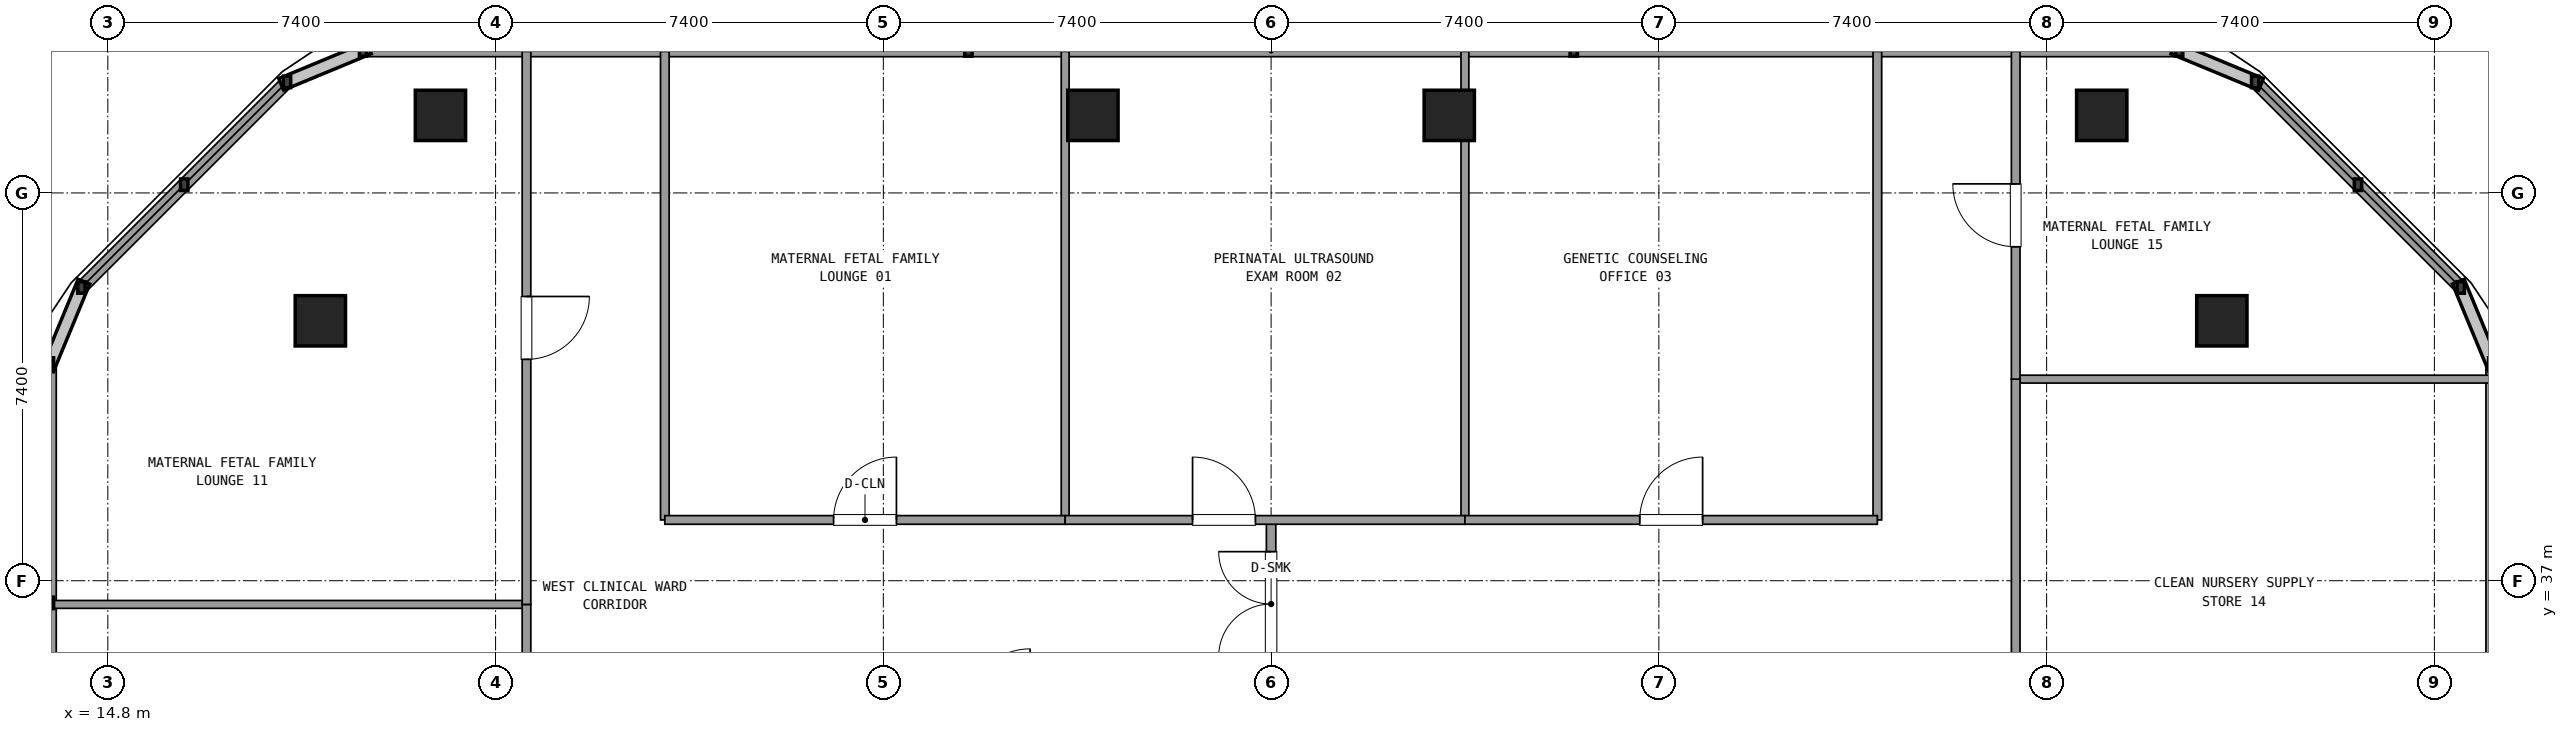
"""IFC4 building model, lengths in metres.
Left out: names, types, materials, properties, quantities, classifications, styles, units other than length and angle.
Written with IfcOpenShell. Run it as: python <this file> out.ifc"""

import sys

from ifc_helpers import new_model, si_unit, direction, frame, frame_2d, origin, origin_2d, place, context, subcontext, project, spatial, rectangle, extrude, element, fill, save


model = new_model("IFC4")
c1 = context("Model", 3, precision=1e-05, world=origin(), true_north=direction((0.0, 1.0)))
c2 = subcontext(c1, "Body", "Model", "MODEL_VIEW")
j1 = project(units=[si_unit("LENGTHUNIT", "METRE"), si_unit("PLANEANGLEUNIT", "RADIAN")], contexts=[c1])
p1 = place(None, origin())
s1 = spatial("IfcSite", under=j1, at=p1, CompositionType="ELEMENT")
p2 = place(p1, origin())
s2 = spatial("IfcBuilding", under=s1, at=p2, CompositionType="ELEMENT")
p3 = place(p2, frame((0.0, 0.0, 163.62)))
s3 = spatial("IfcBuildingStorey", under=s2, at=p3, CompositionType="ELEMENT", Elevation=163.62)
for number, where, z_axis, x_axis in (
    (1, (55.144, 41.96, 0.0), (0.0, 0.0, 1.0), (1.0, 0.0, 0.0)),
    (2, (52.852, 45.88, 0.0), (0.0, 0.0, 1.0), (1.0, 0.0, 0.0)),
    (3, (40.4, 45.88, 0.0), (0.0, 0.0, 1.0), (1.0, 0.0, 0.0)),
    (4, (33.6, 45.88, 0.0), (0.0, 0.0, 1.0), (1.0, 0.0, 0.0)),
    (5, (21.148, 45.88, 0.0), (0.0, 0.0, 1.0), (1.0, 0.0, 0.0)),
    (6, (18.856, 41.96, 0.0), (0.0, 0.0, 1.0), (1.0, 0.0, 0.0)),
):
    element("IfcColumn", number, at=place(p3, frame(where, z_axis=z_axis, x_axis=x_axis)), inside=s3, PredefinedType="COLUMN", context=c2, shape_type="SweptSolid", body=[
        extrude(rectangle(XDim=0.96, YDim=0.96, at=origin_2d()), origin(), (0.0, 0.0, 1.0), 3.6),
    ])
p4 = place(p3, frame((60.304, 10.655, 0.0), z_axis=(0.0, 0.0, 1.0), x_axis=(0.0, 1.0, 0.0)))
e7 = element("IfcWall", 7, at=p4, inside=s3, PredefinedType="SOLIDWALL", context=c2, shape_type="SweptSolid", body=[
    extrude(rectangle(XDim=30.49, YDim=0.24, at=frame_2d((15.245, 0.0))), origin(), (0.0, 0.0, 1.0), 0.85),
])
p5 = place(p3, frame((59.703, 42.596, 0.0), z_axis=(0.0, 0.0, 1.0), x_axis=(-0.707084777957, 0.707128783731, 0.0)))
e8 = element("IfcWall", 8, at=p5, inside=s3, PredefinedType="SOLIDWALL", context=c2, shape_type="SweptSolid", body=[
    extrude(rectangle(XDim=5.548, YDim=0.24, at=frame_2d((2.774, 0.0))), origin(), (0.0, 0.0, 1.0), 0.85),
])
p6 = place(p3, frame((54.329, 47.12, 0.0), z_axis=(0.0, 0.0, 1.0), x_axis=(-1.0, 0.0, 0.0)))
e9 = element("IfcWall", 9, at=p6, inside=s3, PredefinedType="SOLIDWALL", context=c2, shape_type="SweptSolid", body=[
    extrude(rectangle(XDim=34.658, YDim=0.24, at=frame_2d((17.329, 0.0))), origin(), (0.0, 0.0, 1.0), 0.85),
])
p7 = place(p3, frame((18.22, 46.519, 0.0), z_axis=(0.0, 0.0, 1.0), x_axis=(-0.707084777957, -0.707128783731, 0.0)))
e10 = element("IfcWall", 10, at=p7, inside=s3, PredefinedType="SOLIDWALL", context=c2, shape_type="SweptSolid", body=[
    extrude(rectangle(XDim=5.548, YDim=0.24, at=frame_2d((2.774, 0.0))), origin(), (0.0, 0.0, 1.0), 0.85),
])
p8 = place(p3, frame((13.696, 41.145, 0.0), z_axis=(0.0, 0.0, 1.0), x_axis=(0.0, -1.0, 0.0)))
e11 = element("IfcWall", 11, at=p8, inside=s3, PredefinedType="SOLIDWALL", context=c2, shape_type="SweptSolid", body=[
    extrude(rectangle(XDim=13.705, YDim=0.24, at=frame_2d((6.853, 0.0))), origin(), (0.0, 0.0, 1.0), 0.85),
])
p9 = place(p3, frame((37.0, 34.95, 0.0), z_axis=(0.0, 0.0, 1.0), x_axis=(0.0, 1.0, 0.0)))
e12 = element("IfcWall", 12, at=p9, inside=s3, PredefinedType="PARTITIONING", context=c2, shape_type="SweptSolid", body=[
    extrude(rectangle(XDim=3.21, YDim=0.18, at=frame_2d((1.605, 0.0))), origin(), (0.0, 0.0, 1.0), 2.61),
])
p10 = place(p9, frame((0.605, 0.0, 0.0)))
e13 = element("IfcOpeningElement", 13, at=p10, cuts=e12, PredefinedType="OPENING", context=c2, shape_type="SweptSolid", body=[
    extrude(rectangle(XDim=2.0, YDim=2.2, at=frame_2d((1.0, 1.1))), frame((0.0, 0.1, 0.0), z_axis=(0.0, -1.0, 0.0), x_axis=(1.0, 0.0, 0.0)), (0.0, 0.0, 1.0), 0.2),
])
for number, where, z_axis, x_axis in (
    (14, (25.43, 38.16, 0.0), (0.0, 0.0, 1.0), (0.0, 1.0, 0.0)),
    (15, (48.57, 38.16, 0.0), (0.0, 0.0, 1.0), (0.0, 1.0, 0.0)),
):
    element("IfcWall", number, at=place(p3, frame(where, z_axis=z_axis, x_axis=x_axis)), inside=s3, PredefinedType="PARTITIONING", context=c2, shape_type="SweptSolid", body=[
        extrude(rectangle(XDim=8.94, YDim=0.165, at=frame_2d((4.47, 0.0))), origin(), (0.0, 0.0, 1.0), 2.61),
    ])
p11 = place(p3, frame((33.07, 38.16, 0.0), z_axis=(0.0, 0.0, 1.0), x_axis=(0.0, 1.0, 0.0)))
e16 = element("IfcWall", 16, at=p11, inside=s3, PredefinedType="PARTITIONING", context=c2, shape_type="SweptSolid", body=[
    extrude(rectangle(XDim=8.94, YDim=0.15, at=frame_2d((4.47, 0.0))), origin(), (0.0, 0.0, 1.0), 2.61),
])
p12 = place(p3, frame((25.43, 38.16, 0.0), z_axis=(0.0, 0.0, 1.0), x_axis=(1.0, 0.0, 0.0)))
e17 = element("IfcWall", 17, at=p12, inside=s3, PredefinedType="PARTITIONING", context=c2, shape_type="SweptSolid", body=[
    extrude(rectangle(XDim=7.64, YDim=0.165, at=frame_2d((3.82, 0.0))), origin(), (0.0, 0.0, 1.0), 2.61),
])
p13 = place(p12, frame((3.22, 0.0, 0.0)))
e18 = element("IfcOpeningElement", 18, at=p13, cuts=e17, PredefinedType="OPENING", context=c2, shape_type="SweptSolid", body=[
    extrude(rectangle(XDim=1.2, YDim=2.15, at=frame_2d((0.6, 1.075))), frame((0.0, 0.093, 0.0), z_axis=(0.0, -1.0, 0.0), x_axis=(1.0, 0.0, 0.0)), (0.0, 0.0, 1.0), 0.185),
])
p14 = place(p3, frame((40.699, 38.16, 0.0), z_axis=(0.0, 0.0, 1.0), x_axis=(0.0, 1.0, 0.0)))
e19 = element("IfcWall", 19, at=p14, inside=s3, PredefinedType="PARTITIONING", context=c2, shape_type="SweptSolid", body=[
    extrude(rectangle(XDim=8.94, YDim=0.15, at=frame_2d((4.47, 0.0))), origin(), (0.0, 0.0, 1.0), 2.61),
])
p15 = place(p3, frame((33.07, 38.16, 0.0), z_axis=(0.0, 0.0, 1.0), x_axis=(1.0, 0.0, 0.0)))
e20 = element("IfcWall", 20, at=p15, inside=s3, PredefinedType="PARTITIONING", context=c2, shape_type="SweptSolid", body=[
    extrude(rectangle(XDim=7.629, YDim=0.165, at=frame_2d((3.814, 0.0))), origin(), (0.0, 0.0, 1.0), 2.61),
])
p16 = place(p15, frame((2.431, 0.0, 0.0)))
e21 = element("IfcOpeningElement", 21, at=p16, cuts=e20, PredefinedType="OPENING", context=c2, shape_type="SweptSolid", body=[
    extrude(rectangle(XDim=1.2, YDim=2.15, at=frame_2d((0.6, 1.075))), frame((0.0, 0.093, 0.0), z_axis=(0.0, -1.0, 0.0), x_axis=(1.0, 0.0, 0.0)), (0.0, 0.0, 1.0), 0.185),
])
p17 = place(p3, frame((40.699, 38.16, 0.0), z_axis=(0.0, 0.0, 1.0), x_axis=(1.0, 0.0, 0.0)))
e22 = element("IfcWall", 22, at=p17, inside=s3, PredefinedType="PARTITIONING", context=c2, shape_type="SweptSolid", body=[
    extrude(rectangle(XDim=7.871, YDim=0.165, at=frame_2d((3.936, 0.0))), origin(), (0.0, 0.0, 1.0), 2.61),
])
p18 = place(p17, frame((3.336, 0.0, 0.0)))
e23 = element("IfcOpeningElement", 23, at=p18, cuts=e22, PredefinedType="OPENING", context=c2, shape_type="SweptSolid", body=[
    extrude(rectangle(XDim=1.2, YDim=2.15, at=frame_2d((0.6, 1.075))), frame((0.0, 0.093, 0.0), z_axis=(0.0, -1.0, 0.0), x_axis=(1.0, 0.0, 0.0)), (0.0, 0.0, 1.0), 0.185),
])
p19 = place(p3, frame((22.79, 36.548, 0.0), z_axis=(0.0, 0.0, 1.0), x_axis=(-1.0, 0.0, 0.0)))
e24 = element("IfcWall", 24, at=p19, inside=s3, PredefinedType="PARTITIONING", context=c2, shape_type="SweptSolid", body=[
    extrude(rectangle(XDim=9.074, YDim=0.15, at=frame_2d((4.537, 0.0))), origin(), (0.0, 0.0, 1.0), 2.61),
])
p20 = place(p3, frame((22.79, 27.56, 0.0), z_axis=(0.0, 0.0, 1.0), x_axis=(0.0, 1.0, 0.0)))
e25 = element("IfcWall", 25, at=p20, inside=s3, PredefinedType="PARTITIONING", context=c2, shape_type="SweptSolid", body=[
    extrude(rectangle(XDim=8.988, YDim=0.165, at=frame_2d((4.494, 0.0))), origin(), (0.0, 0.0, 1.0), 2.61),
])
p21 = place(p20, frame((3.894, 0.0, 0.0)))
e26 = element("IfcOpeningElement", 26, at=p21, cuts=e25, PredefinedType="OPENING", context=c2, shape_type="SweptSolid", body=[
    extrude(rectangle(XDim=1.2, YDim=2.15, at=frame_2d((0.6, 1.075))), frame((0.0, 0.093, 0.0), z_axis=(0.0, -1.0, 0.0), x_axis=(1.0, 0.0, 0.0)), (0.0, 0.0, 1.0), 0.185),
])
p22 = place(p3, frame((22.79, 36.548, 0.0), z_axis=(0.0, 0.0, 1.0), x_axis=(0.0, 1.0, 0.0)))
e27 = element("IfcWall", 27, at=p22, inside=s3, PredefinedType="PARTITIONING", context=c2, shape_type="SweptSolid", body=[
    extrude(rectangle(XDim=10.552, YDim=0.165, at=frame_2d((5.276, 0.0))), origin(), (0.0, 0.0, 1.0), 2.61),
])
p23 = place(p22, frame((4.676, 0.0, 0.0)))
e28 = element("IfcOpeningElement", 28, at=p23, cuts=e27, PredefinedType="OPENING", context=c2, shape_type="SweptSolid", body=[
    extrude(rectangle(XDim=1.2, YDim=2.15, at=frame_2d((0.6, 1.075))), frame((0.0, 0.093, 0.0), z_axis=(0.0, -1.0, 0.0), x_axis=(1.0, 0.0, 0.0)), (0.0, 0.0, 1.0), 0.185),
])
p24 = place(p3, frame((51.21, 40.847, 0.0), z_axis=(0.0, 0.0, 1.0), x_axis=(1.0, 0.0, 0.0)))
e29 = element("IfcWall", 29, at=p24, inside=s3, PredefinedType="PARTITIONING", context=c2, shape_type="SweptSolid", body=[
    extrude(rectangle(XDim=9.074, YDim=0.15, at=frame_2d((4.537, 0.0))), origin(), (0.0, 0.0, 1.0), 2.61),
])
p25 = place(p3, frame((51.21, 27.56, 0.0), z_axis=(0.0, 0.0, 1.0), x_axis=(0.0, 1.0, 0.0)))
e30 = element("IfcWall", 30, at=p25, inside=s3, PredefinedType="PARTITIONING", context=c2, shape_type="SweptSolid", body=[
    extrude(rectangle(XDim=13.287, YDim=0.165, at=frame_2d((6.644, 0.0))), origin(), (0.0, 0.0, 1.0), 2.61),
])
p26 = place(p25, frame((6.044, 0.0, 0.0)))
e31 = element("IfcOpeningElement", 31, at=p26, cuts=e30, PredefinedType="OPENING", context=c2, shape_type="SweptSolid", body=[
    extrude(rectangle(XDim=1.2, YDim=2.15, at=frame_2d((0.6, 1.075))), frame((0.0, 0.093, 0.0), z_axis=(0.0, -1.0, 0.0), x_axis=(1.0, 0.0, 0.0)), (0.0, 0.0, 1.0), 0.185),
])
p27 = place(p3, frame((51.21, 40.847, 0.0), z_axis=(0.0, 0.0, 1.0), x_axis=(0.0, 1.0, 0.0)))
e32 = element("IfcWall", 32, at=p27, inside=s3, PredefinedType="PARTITIONING", context=c2, shape_type="SweptSolid", body=[
    extrude(rectangle(XDim=6.253, YDim=0.165, at=frame_2d((3.126, 0.0))), origin(), (0.0, 0.0, 1.0), 2.61),
])
p28 = place(p27, frame((2.526, 0.0, 0.0)))
e33 = element("IfcOpeningElement", 33, at=p28, cuts=e32, PredefinedType="OPENING", context=c2, shape_type="SweptSolid", body=[
    extrude(rectangle(XDim=1.2, YDim=2.15, at=frame_2d((0.6, 1.075))), frame((0.0, 0.093, 0.0), z_axis=(0.0, -1.0, 0.0), x_axis=(1.0, 0.0, 0.0)), (0.0, 0.0, 1.0), 0.185),
])
p29 = place(p10, origin())
e34 = element("IfcDoor", 34, at=p29, inside=s3, OperationType="DOUBLE_DOOR_SINGLE_SWING", PredefinedType="DOOR", context=c2, shape_type="SweptSolid", body=[
    extrude(rectangle(XDim=2.0, YDim=2.2, at=frame_2d((1.0, 1.1))), frame((0.0, 0.025, 0.0), z_axis=(0.0, -1.0, 0.0), x_axis=(1.0, 0.0, 0.0)), (0.0, 0.0, 1.0), 0.05),
])
fill(e13, e34)
p30 = place(p13, origin())
e35 = element("IfcDoor", 35, at=p30, inside=s3, OperationType="SINGLE_SWING_RIGHT", PredefinedType="DOOR", context=c2, shape_type="SweptSolid", body=[
    extrude(rectangle(XDim=1.2, YDim=2.15, at=frame_2d((0.6, 1.075))), frame((0.0, 0.025, 0.0), z_axis=(0.0, -1.0, 0.0), x_axis=(1.0, 0.0, 0.0)), (0.0, 0.0, 1.0), 0.05),
])
fill(e18, e35)
p31 = place(p16, origin())
e36 = element("IfcDoor", 36, at=p31, inside=s3, OperationType="SINGLE_SWING_LEFT", PredefinedType="DOOR", context=c2, shape_type="SweptSolid", body=[
    extrude(rectangle(XDim=1.2, YDim=2.15, at=frame_2d((0.6, 1.075))), frame((0.0, 0.025, 0.0), z_axis=(0.0, -1.0, 0.0), x_axis=(1.0, 0.0, 0.0)), (0.0, 0.0, 1.0), 0.05),
])
fill(e21, e36)
p32 = place(p18, origin())
e37 = element("IfcDoor", 37, at=p32, inside=s3, OperationType="SINGLE_SWING_RIGHT", PredefinedType="DOOR", context=c2, shape_type="SweptSolid", body=[
    extrude(rectangle(XDim=1.2, YDim=2.15, at=frame_2d((0.6, 1.075))), frame((0.0, 0.025, 0.0), z_axis=(0.0, -1.0, 0.0), x_axis=(1.0, 0.0, 0.0)), (0.0, 0.0, 1.0), 0.05),
])
fill(e23, e37)
p33 = place(p23, frame((1.2, 0.0, 0.0), z_axis=(0.0, 0.0, 1.0), x_axis=(-1.0, 0.0, 0.0)))
e38 = element("IfcDoor", 38, at=p33, inside=s3, OperationType="SINGLE_SWING_RIGHT", PredefinedType="DOOR", context=c2, shape_type="SweptSolid", body=[
    extrude(rectangle(XDim=1.2, YDim=2.15, at=frame_2d((0.6, 1.075))), frame((0.0, 0.025, 0.0), z_axis=(0.0, -1.0, 0.0), x_axis=(1.0, 0.0, 0.0)), (0.0, 0.0, 1.0), 0.05),
])
fill(e28, e38)
p34 = place(p28, origin())
e39 = element("IfcDoor", 39, at=p34, inside=s3, OperationType="SINGLE_SWING_RIGHT", PredefinedType="DOOR", context=c2, shape_type="SweptSolid", body=[
    extrude(rectangle(XDim=1.2, YDim=2.15, at=frame_2d((0.6, 1.075))), frame((0.0, 0.025, 0.0), z_axis=(0.0, -1.0, 0.0), x_axis=(1.0, 0.0, 0.0)), (0.0, 0.0, 1.0), 0.05),
])
fill(e33, e39)
save(model, sys.argv[1])
